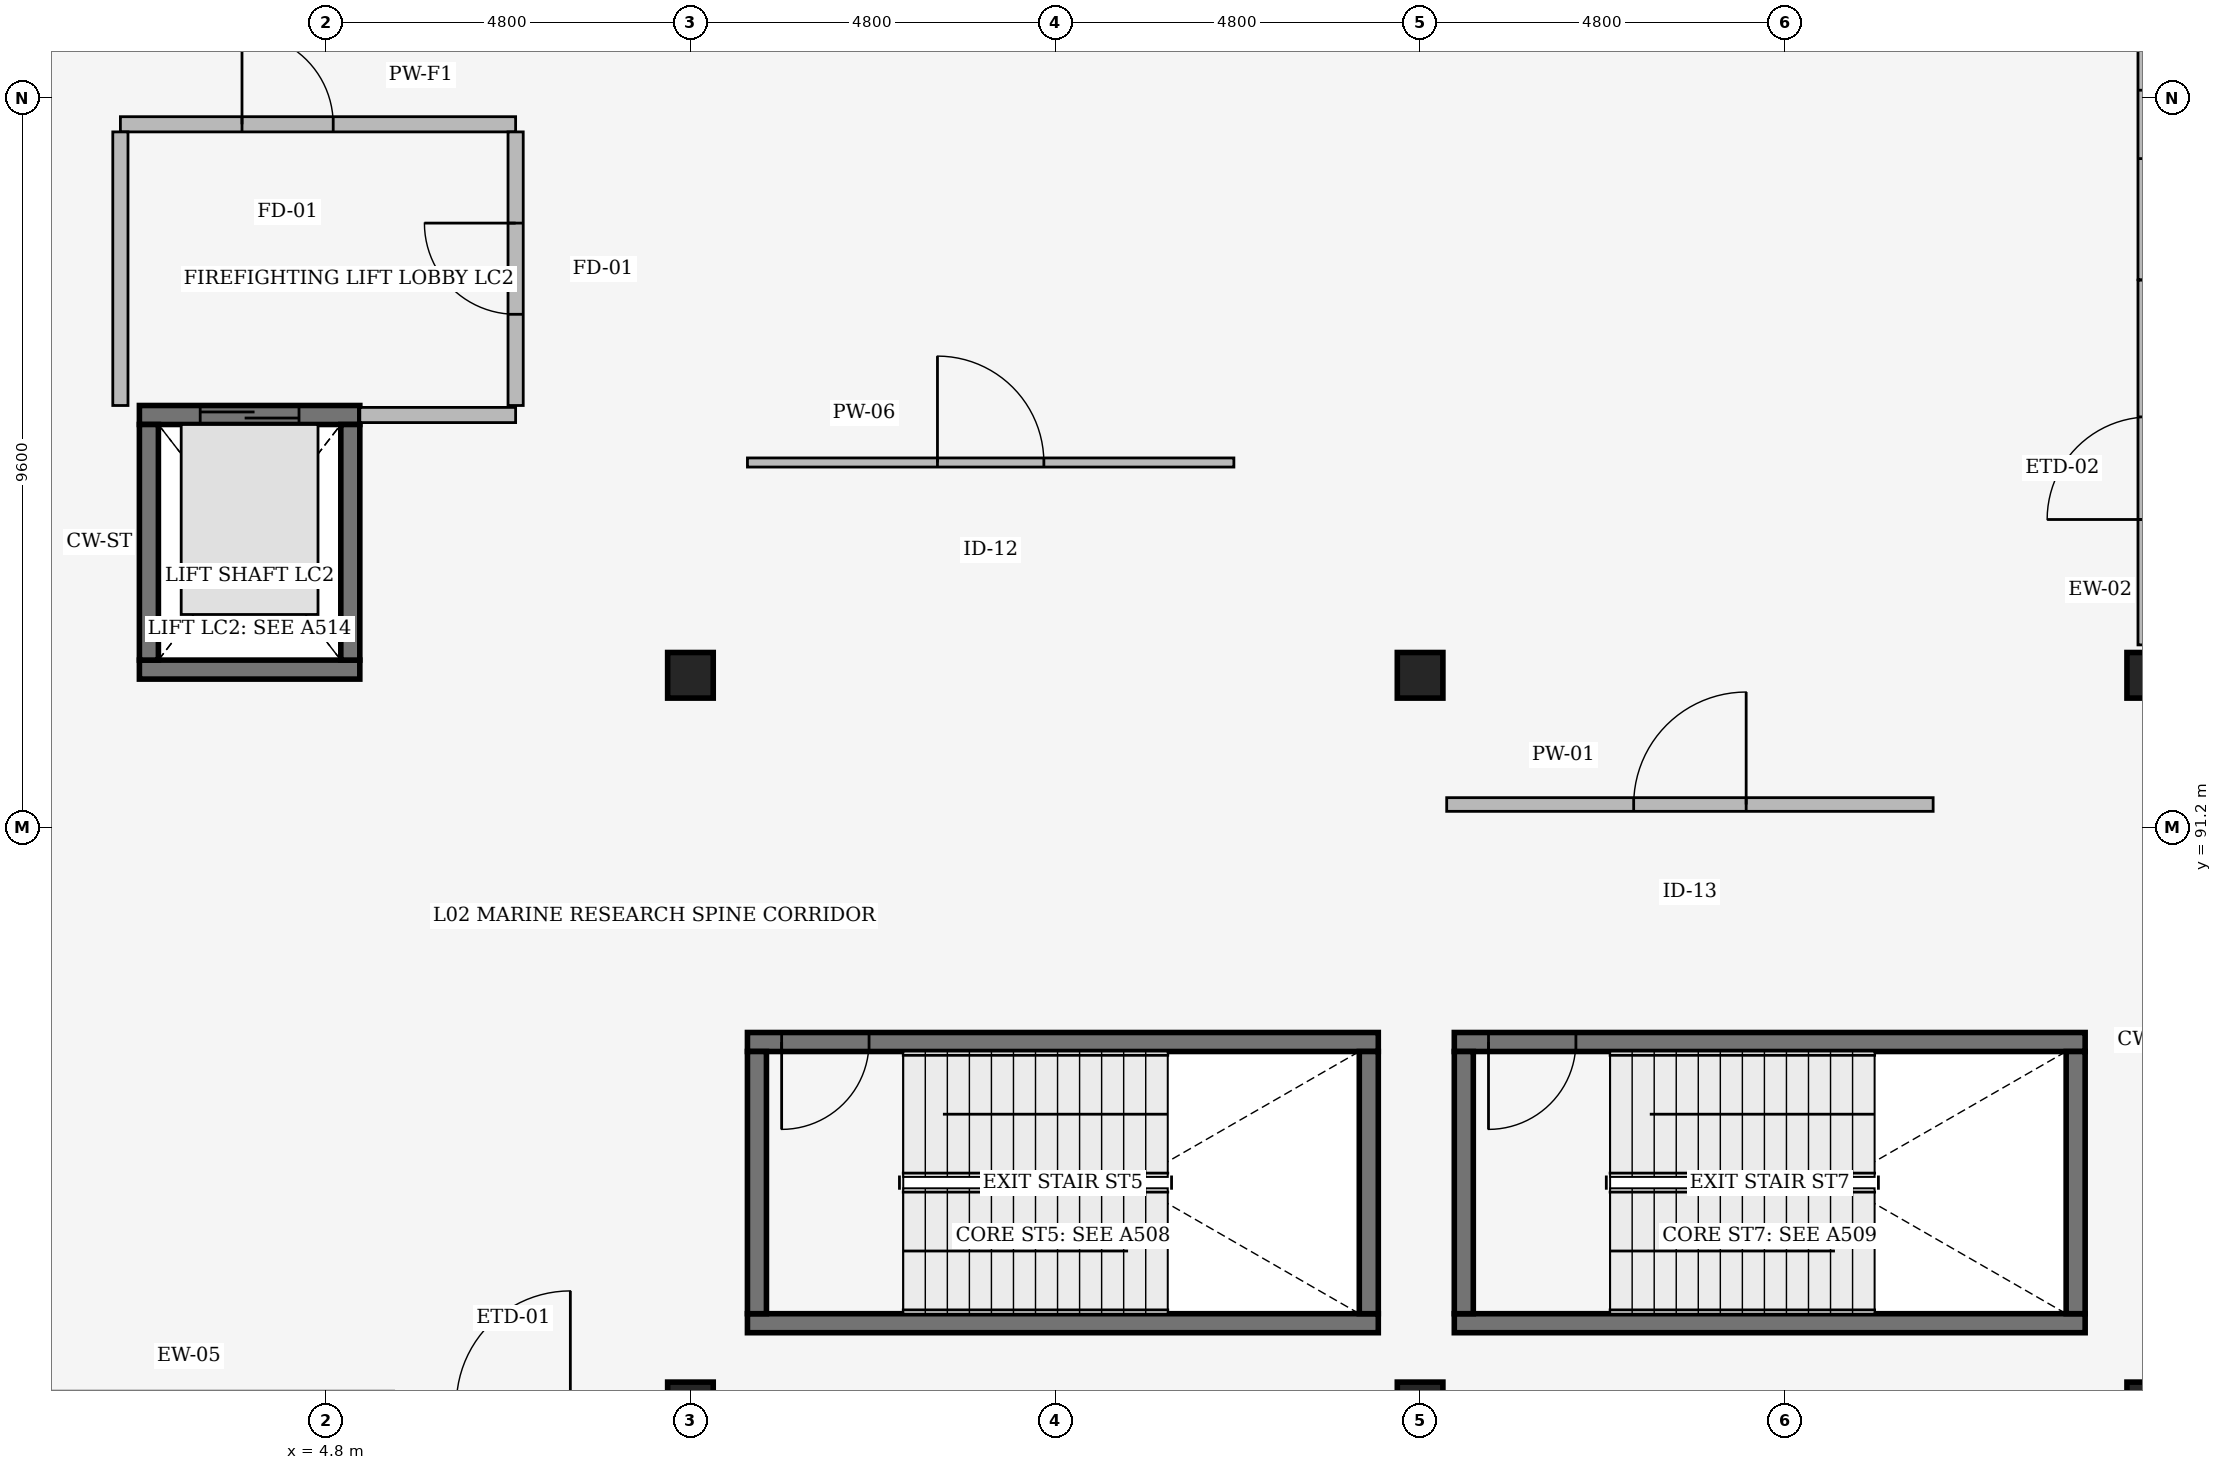
"""IFC4 building model, lengths in metres.
Left out: names, types, materials, properties, quantities, classifications, styles, units other than length and angle.
Written with IfcOpenShell. Run it as: python <this file> out.ifc"""

import sys

from ifc_helpers import new_model, si_unit, direction, frame, frame_2d, origin, origin_2d, place, context, subcontext, project, spatial, rectangle, extrude, element, fill, save


model = new_model("IFC4")
c1 = context("Model", 3, precision=1e-05, world=origin(), true_north=direction((0.0, 1.0)))
c2 = subcontext(c1, "Body", "Model", "MODEL_VIEW")
j1 = project(units=[si_unit("LENGTHUNIT", "METRE"), si_unit("PLANEANGLEUNIT", "RADIAN")], contexts=[c1])
p1 = place(None, origin())
s1 = spatial("IfcSite", under=j1, at=p1, CompositionType="ELEMENT")
p2 = place(p1, origin())
s2 = spatial("IfcBuilding", under=s1, at=p2, CompositionType="ELEMENT")
p3 = place(p2, frame((0.0, 0.0, 10.5)))
s3 = spatial("IfcBuildingStorey", under=s2, at=p3, CompositionType="ELEMENT", Elevation=10.5)
for number, where, z_axis, x_axis in (
    (1, (9.6, 83.6, 0.0), (0.0, 0.0, 1.0), (1.0, 0.0, 0.0)),
    (2, (9.6, 93.2, 0.0), (0.0, 0.0, 1.0), (1.0, 0.0, 0.0)),
    (3, (19.2, 83.6, 0.0), (0.0, 0.0, 1.0), (1.0, 0.0, 0.0)),
    (4, (19.2, 93.2, 0.0), (0.0, 0.0, 1.0), (1.0, 0.0, 0.0)),
    (5, (28.8, 83.6, 0.0), (0.0, 0.0, 1.0), (1.0, 0.0, 0.0)),
    (6, (28.8, 93.2, 0.0), (0.0, 0.0, 1.0), (1.0, 0.0, 0.0)),
):
    element("IfcColumn", number, at=place(p3, frame(where, z_axis=z_axis, x_axis=x_axis)), inside=s3, PredefinedType="COLUMN", context=c2, shape_type="SweptSolid", body=[
        extrude(rectangle(XDim=0.6, YDim=0.6, at=origin_2d()), origin(), (0.0, 0.0, 1.0), 4.8),
    ])
p4 = place(p3, frame((28.8, 93.6, 0.0), z_axis=(0.0, 0.0, 1.0), x_axis=(0.0, 1.0, 0.0)))
e7 = element("IfcWall", 7, at=p4, inside=s3, PredefinedType="SOLIDWALL", context=c2, shape_type="SweptSolid", body=[
    extrude(rectangle(XDim=4.8, YDim=0.31, at=frame_2d((2.4, 0.0))), origin(), (0.0, 0.0, 1.0), 4.178),
])
p5 = place(p4, frame((3.0, 0.0, 0.0), z_axis=(0.0, 0.0, 1.0), x_axis=(-1.0, 0.0, 0.0)))
e8 = element("IfcOpeningElement", 8, at=p5, cuts=e7, PredefinedType="OPENING", context=c2, shape_type="SweptSolid", body=[
    extrude(rectangle(XDim=1.35, YDim=2.2, at=frame_2d((0.675, 1.1))), frame((0.0, 0.165, 0.0), z_axis=(0.0, -1.0, 0.0), x_axis=(1.0, 0.0, 0.0)), (0.0, 0.0, 1.0), 0.33),
])
p6 = place(p3, frame((28.8, 98.405, 0.0), z_axis=(0.0, 0.0, 1.0), x_axis=(0.0, 1.0, 0.0)))
e9 = element("IfcWall", 9, at=p6, inside=s3, PredefinedType="SOLIDWALL", context=c2, shape_type="SweptSolid", body=[
    extrude(rectangle(XDim=4.087, YDim=0.31, at=frame_2d((2.043, 0.0))), origin(), (0.0, 0.0, 1.0), 4.178),
])
p7 = place(p6, frame((1.594, 0.0, 0.95)))
e10 = element("IfcOpeningElement", 10, at=p7, cuts=e9, PredefinedType="OPENING", context=c2, shape_type="SweptSolid", body=[
    extrude(rectangle(XDim=0.9, YDim=2.1, at=frame_2d((0.45, 1.05))), frame((0.0, 0.165, 0.0), z_axis=(0.0, -1.0, 0.0), x_axis=(1.0, 0.0, 0.0)), (0.0, 0.0, 1.0), 0.33),
])
p8 = place(p3, frame((10.35, 84.675, 0.0), z_axis=(0.0, 0.0, 1.0), x_axis=(1.0, 0.0, 0.0)))
e11 = element("IfcWall", 11, at=p8, inside=s3, PredefinedType="SHEAR", context=c2, shape_type="SweptSolid", body=[
    extrude(rectangle(XDim=8.3, YDim=0.25, at=frame_2d((4.15, 0.0))), origin(), (0.0, 0.0, 1.0), 4.52),
])
p9 = place(p3, frame((18.65, 88.375, 0.0), z_axis=(0.0, 0.0, 1.0), x_axis=(-1.0, 0.0, 0.0)))
e12 = element("IfcWall", 12, at=p9, inside=s3, PredefinedType="SHEAR", context=c2, shape_type="SweptSolid", body=[
    extrude(rectangle(XDim=8.3, YDim=0.25, at=frame_2d((4.15, 0.0))), origin(), (0.0, 0.0, 1.0), 4.52),
])
p10 = place(p9, frame((7.85, 0.0, 0.0), z_axis=(0.0, 0.0, 1.0), x_axis=(-1.0, 0.0, 0.0)))
e13 = element("IfcOpeningElement", 13, at=p10, cuts=e12, PredefinedType="OPENING", context=c2, shape_type="SweptSolid", body=[
    extrude(rectangle(XDim=1.15, YDim=2.2, at=frame_2d((0.575, 1.1))), frame((0.0, 0.135, 0.0), z_axis=(0.0, -1.0, 0.0), x_axis=(1.0, 0.0, 0.0)), (0.0, 0.0, 1.0), 0.27),
])
for number, where, z_axis, x_axis in (
    (14, (10.475, 88.25, 0.0), (0.0, 0.0, 1.0), (0.0, -1.0, 0.0)),
    (15, (18.525, 84.8, 0.0), (0.0, 0.0, 1.0), (0.0, 1.0, 0.0)),
):
    element("IfcWall", number, at=place(p3, frame(where, z_axis=z_axis, x_axis=x_axis)), inside=s3, PredefinedType="SHEAR", context=c2, shape_type="SweptSolid", body=[
        extrude(rectangle(XDim=3.45, YDim=0.25, at=frame_2d((1.725, 0.0))), origin(), (0.0, 0.0, 1.0), 4.52),
    ])
p11 = place(p3, frame((19.65, 84.675, 0.0), z_axis=(0.0, 0.0, 1.0), x_axis=(1.0, 0.0, 0.0)))
e16 = element("IfcWall", 16, at=p11, inside=s3, PredefinedType="SHEAR", context=c2, shape_type="SweptSolid", body=[
    extrude(rectangle(XDim=8.3, YDim=0.25, at=frame_2d((4.15, 0.0))), origin(), (0.0, 0.0, 1.0), 4.52),
])
p12 = place(p3, frame((27.95, 88.375, 0.0), z_axis=(0.0, 0.0, 1.0), x_axis=(-1.0, 0.0, 0.0)))
e17 = element("IfcWall", 17, at=p12, inside=s3, PredefinedType="SHEAR", context=c2, shape_type="SweptSolid", body=[
    extrude(rectangle(XDim=8.3, YDim=0.25, at=frame_2d((4.15, 0.0))), origin(), (0.0, 0.0, 1.0), 4.52),
])
p13 = place(p12, frame((7.85, 0.0, 0.0), z_axis=(0.0, 0.0, 1.0), x_axis=(-1.0, 0.0, 0.0)))
e18 = element("IfcOpeningElement", 18, at=p13, cuts=e17, PredefinedType="OPENING", context=c2, shape_type="SweptSolid", body=[
    extrude(rectangle(XDim=1.15, YDim=2.2, at=frame_2d((0.575, 1.1))), frame((0.0, 0.135, 0.0), z_axis=(0.0, -1.0, 0.0), x_axis=(1.0, 0.0, 0.0)), (0.0, 0.0, 1.0), 0.27),
])
for number, where, z_axis, x_axis in (
    (19, (19.775, 88.25, 0.0), (0.0, 0.0, 1.0), (0.0, -1.0, 0.0)),
    (20, (27.825, 84.8, 0.0), (0.0, 0.0, 1.0), (0.0, 1.0, 0.0)),
):
    element("IfcWall", number, at=place(p3, frame(where, z_axis=z_axis, x_axis=x_axis)), inside=s3, PredefinedType="SHEAR", context=c2, shape_type="SweptSolid", body=[
        extrude(rectangle(XDim=3.45, YDim=0.25, at=frame_2d((1.725, 0.0))), origin(), (0.0, 0.0, 1.0), 4.52),
    ])
p14 = place(p3, frame((2.35, 93.275, 0.0), z_axis=(0.0, 0.0, 1.0), x_axis=(1.0, 0.0, 0.0)))
e21 = element("IfcWall", 21, at=p14, inside=s3, PredefinedType="SHEAR", context=c2, shape_type="SweptSolid", body=[
    extrude(rectangle(XDim=2.9, YDim=0.25, at=frame_2d((1.45, 0.0))), origin(), (0.0, 0.0, 1.0), 4.52),
])
p15 = place(p3, frame((2.35, 96.625, 0.0), z_axis=(0.0, 0.0, 1.0), x_axis=(1.0, 0.0, 0.0)))
e22 = element("IfcWall", 22, at=p15, inside=s3, PredefinedType="SHEAR", context=c2, shape_type="SweptSolid", body=[
    extrude(rectangle(XDim=2.9, YDim=0.25, at=frame_2d((1.45, 0.0))), origin(), (0.0, 0.0, 1.0), 4.52),
])
p16 = place(p15, frame((0.8, 0.0, 0.0)))
e23 = element("IfcOpeningElement", 23, at=p16, cuts=e22, PredefinedType="OPENING", context=c2, shape_type="SweptSolid", body=[
    extrude(rectangle(XDim=1.3, YDim=2.2, at=frame_2d((0.65, 1.1))), frame((0.0, 0.135, 0.0), z_axis=(0.0, -1.0, 0.0), x_axis=(1.0, 0.0, 0.0)), (0.0, 0.0, 1.0), 0.27),
])
for number, where, z_axis, x_axis in (
    (24, (2.475, 93.4, 0.0), (0.0, 0.0, 1.0), (0.0, 1.0, 0.0)),
    (25, (5.125, 93.4, 0.0), (0.0, 0.0, 1.0), (0.0, 1.0, 0.0)),
):
    element("IfcWall", number, at=place(p3, frame(where, z_axis=z_axis, x_axis=x_axis)), inside=s3, PredefinedType="SHEAR", context=c2, shape_type="SweptSolid", body=[
        extrude(rectangle(XDim=3.1, YDim=0.25, at=frame_2d((1.55, 0.0))), origin(), (0.0, 0.0, 1.0), 4.52),
    ])
p17 = place(p3, frame((2.1, 100.45, 0.0), z_axis=(0.0, 0.0, 1.0), x_axis=(1.0, 0.0, 0.0)))
e26 = element("IfcWall", 26, at=p17, inside=s3, PredefinedType="PARTITIONING", context=c2, shape_type="SweptSolid", body=[
    extrude(rectangle(XDim=5.2, YDim=0.2, at=frame_2d((2.6, 0.0))), origin(), (0.0, 0.0, 1.0), 4.176),
])
p18 = place(p17, frame((1.6, 0.0, 0.0)))
e27 = element("IfcOpeningElement", 27, at=p18, cuts=e26, PredefinedType="OPENING", context=c2, shape_type="SweptSolid", body=[
    extrude(rectangle(XDim=1.2, YDim=2.2, at=frame_2d((0.6, 1.1))), frame((0.0, 0.11, 0.0), z_axis=(0.0, -1.0, 0.0), x_axis=(1.0, 0.0, 0.0)), (0.0, 0.0, 1.0), 0.22),
])
p19 = place(p3, frame((2.1, 96.75, 0.0), z_axis=(0.0, 0.0, 1.0), x_axis=(0.0, 1.0, 0.0)))
e28 = element("IfcWall", 28, at=p19, inside=s3, PredefinedType="PARTITIONING", context=c2, shape_type="SweptSolid", body=[
    extrude(rectangle(XDim=3.6, YDim=0.2, at=frame_2d((1.8, 0.0))), origin(), (0.0, 0.0, 1.0), 4.133),
])
p20 = place(p3, frame((7.3, 96.75, 0.0), z_axis=(0.0, 0.0, 1.0), x_axis=(0.0, 1.0, 0.0)))
e29 = element("IfcWall", 29, at=p20, inside=s3, PredefinedType="PARTITIONING", context=c2, shape_type="SweptSolid", body=[
    extrude(rectangle(XDim=3.6, YDim=0.2, at=frame_2d((1.8, 0.0))), origin(), (0.0, 0.0, 1.0), 4.133),
])
p21 = place(p20, frame((1.2, 0.0, 0.0)))
e30 = element("IfcOpeningElement", 30, at=p21, cuts=e29, PredefinedType="OPENING", context=c2, shape_type="SweptSolid", body=[
    extrude(rectangle(XDim=1.2, YDim=2.2, at=frame_2d((0.6, 1.1))), frame((0.0, 0.11, 0.0), z_axis=(0.0, -1.0, 0.0), x_axis=(1.0, 0.0, 0.0)), (0.0, 0.0, 1.0), 0.22),
])
p22 = place(p3, frame((5.25, 96.625, 0.0), z_axis=(0.0, 0.0, 1.0), x_axis=(1.0, 0.0, 0.0)))
e31 = element("IfcWall", 31, at=p22, inside=s3, PredefinedType="PARTITIONING", context=c2, shape_type="SweptSolid", body=[
    extrude(rectangle(XDim=2.05, YDim=0.2, at=frame_2d((1.025, 0.0))), origin(), (0.0, 0.0, 1.0), 4.44),
])
p23 = place(p3, frame((10.35, 96.0, 0.0), z_axis=(0.0, 0.0, 1.0), x_axis=(1.0, 0.0, 0.0)))
e32 = element("IfcWall", 32, at=p23, inside=s3, PredefinedType="PARTITIONING", context=c2, shape_type="SweptSolid", body=[
    extrude(rectangle(XDim=6.4, YDim=0.12, at=frame_2d((3.2, 0.0))), origin(), (0.0, 0.0, 1.0), 4.234),
])
p24 = place(p23, frame((2.5, 0.0, 0.0)))
e33 = element("IfcOpeningElement", 33, at=p24, cuts=e32, PredefinedType="OPENING", context=c2, shape_type="SweptSolid", body=[
    extrude(rectangle(XDim=1.4, YDim=2.3, at=frame_2d((0.7, 1.15))), frame((0.0, 0.07, 0.0), z_axis=(0.0, -1.0, 0.0), x_axis=(1.0, 0.0, 0.0)), (0.0, 0.0, 1.0), 0.14),
])
p25 = place(p3, frame((19.55, 91.5, 0.0), z_axis=(0.0, 0.0, 1.0), x_axis=(1.0, 0.0, 0.0)))
e34 = element("IfcWall", 34, at=p25, inside=s3, PredefinedType="PARTITIONING", context=c2, shape_type="SweptSolid", body=[
    extrude(rectangle(XDim=6.4, YDim=0.18, at=frame_2d((3.2, 0.0))), origin(), (0.0, 0.0, 1.0), 4.017),
])
p26 = place(p25, frame((2.46, 0.0, 0.0)))
e35 = element("IfcOpeningElement", 35, at=p26, cuts=e34, PredefinedType="OPENING", context=c2, shape_type="SweptSolid", body=[
    extrude(rectangle(XDim=1.48, YDim=2.3, at=frame_2d((0.74, 1.15))), frame((0.0, 0.1, 0.0), z_axis=(0.0, -1.0, 0.0), x_axis=(1.0, 0.0, 0.0)), (0.0, 0.0, 1.0), 0.2),
])
p27 = place(p10, origin())
e36 = element("IfcDoor", 36, at=p27, inside=s3, OperationType="SINGLE_SWING_LEFT", PredefinedType="DOOR", context=c2, shape_type="SweptSolid", body=[
    extrude(rectangle(XDim=1.15, YDim=2.2, at=frame_2d((0.575, 1.1))), frame((0.0, 0.025, 0.0), z_axis=(0.0, -1.0, 0.0), x_axis=(1.0, 0.0, 0.0)), (0.0, 0.0, 1.0), 0.05),
])
fill(e13, e36)
p28 = place(p13, origin())
e37 = element("IfcDoor", 37, at=p28, inside=s3, OperationType="SINGLE_SWING_LEFT", PredefinedType="DOOR", context=c2, shape_type="SweptSolid", body=[
    extrude(rectangle(XDim=1.15, YDim=2.2, at=frame_2d((0.575, 1.1))), frame((0.0, 0.025, 0.0), z_axis=(0.0, -1.0, 0.0), x_axis=(1.0, 0.0, 0.0)), (0.0, 0.0, 1.0), 0.05),
])
fill(e18, e37)
p29 = place(p16, origin())
e38 = element("IfcDoor", 38, at=p29, inside=s3, OperationType="DOUBLE_DOOR_SLIDING", PredefinedType="DOOR", context=c2, shape_type="SweptSolid", body=[
    extrude(rectangle(XDim=1.3, YDim=2.2, at=frame_2d((0.65, 1.1))), frame((0.0, 0.025, 0.0), z_axis=(0.0, -1.0, 0.0), x_axis=(1.0, 0.0, 0.0)), (0.0, 0.0, 1.0), 0.05),
])
fill(e23, e38)
p30 = place(p21, origin())
e39 = element("IfcDoor", 39, at=p30, inside=s3, OperationType="SINGLE_SWING_RIGHT", PredefinedType="DOOR", context=c2, shape_type="SweptSolid", body=[
    extrude(rectangle(XDim=1.2, YDim=2.2, at=frame_2d((0.6, 1.1))), frame((0.0, 0.025, 0.0), z_axis=(0.0, -1.0, 0.0), x_axis=(1.0, 0.0, 0.0)), (0.0, 0.0, 1.0), 0.05),
])
fill(e30, e39)
p31 = place(p18, origin())
e40 = element("IfcDoor", 40, at=p31, inside=s3, OperationType="SINGLE_SWING_LEFT", PredefinedType="DOOR", context=c2, shape_type="SweptSolid", body=[
    extrude(rectangle(XDim=1.2, YDim=2.2, at=frame_2d((0.6, 1.1))), frame((0.0, 0.025, 0.0), z_axis=(0.0, -1.0, 0.0), x_axis=(1.0, 0.0, 0.0)), (0.0, 0.0, 1.0), 0.05),
])
fill(e27, e40)
p32 = place(p24, origin())
e41 = element("IfcDoor", 41, at=p32, inside=s3, OperationType="SINGLE_SWING_LEFT", PredefinedType="DOOR", context=c2, shape_type="SweptSolid", body=[
    extrude(rectangle(XDim=1.4, YDim=2.3, at=frame_2d((0.7, 1.15))), frame((0.0, 0.025, 0.0), z_axis=(0.0, -1.0, 0.0), x_axis=(1.0, 0.0, 0.0)), (0.0, 0.0, 1.0), 0.05),
])
fill(e33, e41)
p33 = place(p26, origin())
e42 = element("IfcDoor", 42, at=p33, inside=s3, OperationType="SINGLE_SWING_RIGHT", PredefinedType="DOOR", context=c2, shape_type="SweptSolid", body=[
    extrude(rectangle(XDim=1.48, YDim=2.3, at=frame_2d((0.74, 1.15))), frame((0.0, 0.025, 0.0), z_axis=(0.0, -1.0, 0.0), x_axis=(1.0, 0.0, 0.0)), (0.0, 0.0, 1.0), 0.05),
])
fill(e35, e42)
save(model, sys.argv[1])
